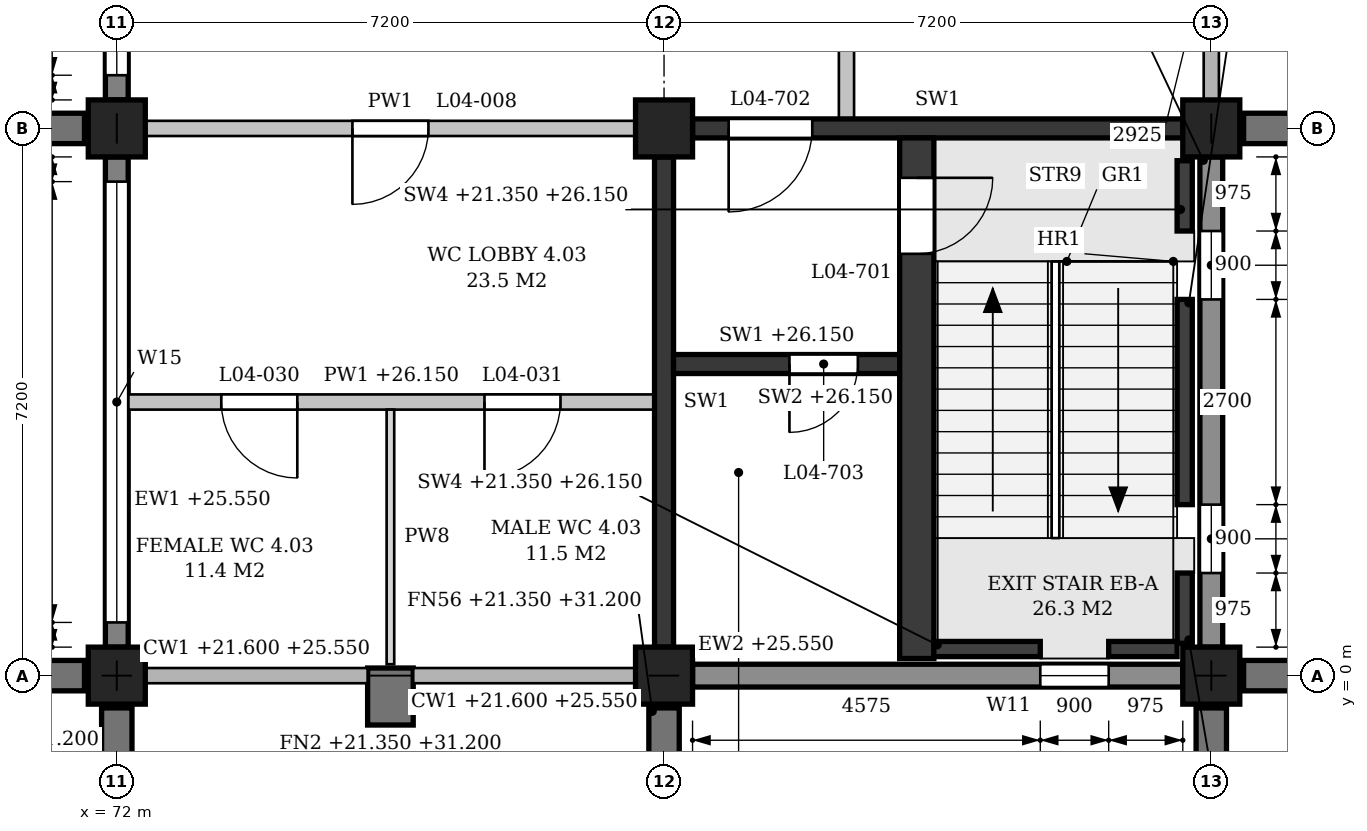
"""IFC4 building model, lengths in metres.
Left out: names, types, materials, properties, quantities, classifications, styles, units other than length and angle.
Written with IfcOpenShell. Run it as: python <this file> out.ifc"""

import sys

from ifc_helpers import new_model, si_unit, direction, frame, frame_2d, origin, origin_2d, place, context, subcontext, project, spatial, polyline, rectangle, outline, extrude, element, fill, save


model = new_model("IFC4")
c1 = context("Model", 3, precision=1e-05, world=origin(), true_north=direction((0.0, 1.0)))
c2 = subcontext(c1, "Body", "Model", "MODEL_VIEW")
j1 = project(units=[si_unit("LENGTHUNIT", "METRE"), si_unit("PLANEANGLEUNIT", "RADIAN")], contexts=[c1])
p1 = place(None, origin())
s1 = spatial("IfcSite", under=j1, at=p1, CompositionType="ELEMENT")
p2 = place(p1, origin())
s2 = spatial("IfcBuilding", under=s1, at=p2, CompositionType="ELEMENT")
p3 = place(p2, frame((0.0, 0.0, 21.6)))
s3 = spatial("IfcBuildingStorey", under=s2, at=p3, CompositionType="ELEMENT", Elevation=21.6)
for number, where, z_axis, x_axis in (
    (1, (72.0, 0.0, 0.0), (0.0, 0.0, 1.0), (1.0, 0.0, 0.0)),
    (2, (72.0, 7.2, 0.0), (0.0, 0.0, 1.0), (1.0, 0.0, 0.0)),
    (3, (79.2, 0.0, 0.0), (0.0, 0.0, 1.0), (1.0, 0.0, 0.0)),
    (4, (79.2, 7.2, 0.0), (0.0, 0.0, 1.0), (1.0, 0.0, 0.0)),
    (5, (86.4, 0.0, 0.0), (0.0, 0.0, 1.0), (1.0, 0.0, 0.0)),
    (6, (86.4, 7.2, 0.0), (0.0, 0.0, 1.0), (1.0, 0.0, 0.0)),
):
    element("IfcColumn", number, at=place(p3, frame(where, z_axis=z_axis, x_axis=x_axis)), inside=s3, PredefinedType="COLUMN", context=c2, shape_type="SweptSolid", body=[
        extrude(rectangle(XDim=0.75, YDim=0.75, at=origin_2d()), origin(), (0.0, 0.0, 1.0), 4.8),
    ])
p4 = place(p3, frame((79.575, 0.0, 0.0), z_axis=(0.0, 0.0, 1.0), x_axis=(1.0, 0.0, 0.0)))
e7 = element("IfcWall", 7, at=p4, inside=s3, PredefinedType="STANDARD", context=c2, shape_type="SweptSolid", body=[
    extrude(rectangle(XDim=6.45, YDim=0.3, at=frame_2d((3.225, 0.0))), origin(), (0.0, 0.0, 1.0), 3.95),
])
p5 = place(p4, frame((4.575, 0.0, 0.9)))
e8 = element("IfcOpeningElement", 8, at=p5, cuts=e7, PredefinedType="OPENING", context=c2, shape_type="SweptSolid", body=[
    extrude(outline(polyline([(0.0, 0.0), (0.9, 0.0), (0.9, 2.05), (0.45, 2.5), (0.0, 2.05), (0.0, 0.0)])), frame((0.0, 0.16, 0.0), z_axis=(0.0, -1.0, 0.0), x_axis=(1.0, 0.0, 0.0)), (0.0, 0.0, 1.0), 0.32),
])
p6 = place(p3, frame((86.4, 0.375, 0.0), z_axis=(0.0, 0.0, 1.0), x_axis=(0.0, 1.0, 0.0)))
e9 = element("IfcWall", 9, at=p6, inside=s3, PredefinedType="STANDARD", context=c2, shape_type="SweptSolid", body=[
    extrude(rectangle(XDim=6.45, YDim=0.3, at=frame_2d((3.225, 0.0))), origin(), (0.0, 0.0, 1.0), 3.95),
])
p7 = place(p6, frame((0.975, 0.0, 0.9)))
e10 = element("IfcOpeningElement", 10, at=p7, cuts=e9, PredefinedType="OPENING", context=c2, shape_type="SweptSolid", body=[
    extrude(outline(polyline([(0.0, 0.0), (0.9, 0.0), (0.9, 2.05), (0.45, 2.5), (0.0, 2.05), (0.0, 0.0)])), frame((0.0, 0.16, 0.0), z_axis=(0.0, -1.0, 0.0), x_axis=(1.0, 0.0, 0.0)), (0.0, 0.0, 1.0), 0.32),
])
p8 = place(p6, frame((4.575, 0.0, 0.9)))
e11 = element("IfcOpeningElement", 11, at=p8, cuts=e9, PredefinedType="OPENING", context=c2, shape_type="SweptSolid", body=[
    extrude(outline(polyline([(0.0, 0.0), (0.9, 0.0), (0.9, 2.05), (0.45, 2.5), (0.0, 2.05), (0.0, 0.0)])), frame((0.0, 0.16, 0.0), z_axis=(0.0, -1.0, 0.0), x_axis=(1.0, 0.0, 0.0)), (0.0, 0.0, 1.0), 0.32),
])
p9 = place(p3, frame((72.0, 0.375, 0.0), z_axis=(0.0, 0.0, 1.0), x_axis=(0.0, 1.0, 0.0)))
e12 = element("IfcWall", 12, at=p9, inside=s3, PredefinedType="STANDARD", context=c2, shape_type="SweptSolid", body=[
    extrude(rectangle(XDim=6.45, YDim=0.3, at=frame_2d((3.225, 0.0))), origin(), (0.0, 0.0, 1.0), 3.95),
])
p10 = place(p9, frame((0.325, 0.0, 0.9)))
e13 = element("IfcOpeningElement", 13, at=p10, cuts=e12, PredefinedType="OPENING", context=c2, shape_type="SweptSolid", body=[
    extrude(outline(polyline([(0.0, 0.0), (5.8, 0.0), (5.8, 1.0), (2.9, 2.5), (0.0, 1.0), (0.0, 0.0)])), frame((0.0, 0.16, 0.0), z_axis=(0.0, -1.0, 0.0), x_axis=(1.0, 0.0, 0.0)), (0.0, 0.0, 1.0), 0.32),
])
p11 = place(p3, frame((72.0, 7.575, 0.0), z_axis=(0.0, 0.0, 1.0), x_axis=(0.0, 1.0, 0.0)))
e14 = element("IfcWall", 14, at=p11, inside=s3, PredefinedType="STANDARD", context=c2, shape_type="SweptSolid", body=[
    extrude(rectangle(XDim=6.45, YDim=0.3, at=frame_2d((3.225, 0.0))), origin(), (0.0, 0.0, 1.0), 3.95),
])
p12 = place(p11, frame((0.325, 0.0, 0.9)))
e15 = element("IfcOpeningElement", 15, at=p12, cuts=e14, PredefinedType="OPENING", context=c2, shape_type="SweptSolid", body=[
    extrude(outline(polyline([(0.0, 0.0), (5.8, 0.0), (5.8, 1.0), (2.9, 2.5), (0.0, 1.0), (0.0, 0.0)])), frame((0.0, 0.16, 0.0), z_axis=(0.0, -1.0, 0.0), x_axis=(1.0, 0.0, 0.0)), (0.0, 0.0, 1.0), 0.32),
])
p13 = place(p3, frame((75.6, 0.1, -0.25), z_axis=(0.0, 0.0, 1.0), x_axis=(0.0, -1.0, 0.0)))
e16 = element("IfcWall", 16, at=p13, inside=s3, PredefinedType="POLYGONAL", context=c2, shape_type="SweptSolid", body=[
    extrude(outline(polyline([(0.75, 0.0), (0.75, 9.4), (0.45, 9.85), (0.3, 9.85), (0.3, 8.95), (0.0, 8.95), (0.0, 5.05), (0.35, 5.05), (0.35, 4.2), (0.0, 4.2), (0.0, 0.25), (0.35, 0.25), (0.35, 0.0), (0.75, 0.0)])), frame((0.0, 0.3, 0.0), z_axis=(0.0, -1.0, 0.0), x_axis=(1.0, 0.0, 0.0)), (0.0, 0.0, 1.0), 0.6),
])
p14 = place(p3, frame((71.575, 0.0, -0.25), z_axis=(0.0, 0.0, 1.0), x_axis=(-1.0, 0.0, 0.0)))
e17 = element("IfcWall", 17, at=p14, inside=s3, PredefinedType="POLYGONAL", context=c2, shape_type="SweptSolid", body=[
    extrude(outline(polyline([(0.6, 0.0), (0.6, 9.175), (0.15, 9.85), (0.0, 9.85), (0.0, 0.0), (0.6, 0.0)])), frame((0.0, 0.2, 0.0), z_axis=(0.0, -1.0, 0.0), x_axis=(1.0, 0.0, 0.0)), (0.0, 0.0, 1.0), 0.4),
])
p15 = place(p3, frame((72.0, -0.425, -0.25), z_axis=(0.0, 0.0, 1.0), x_axis=(0.0, -1.0, 0.0)))
e18 = element("IfcWall", 18, at=p15, inside=s3, PredefinedType="POLYGONAL", context=c2, shape_type="SweptSolid", body=[
    extrude(outline(polyline([(0.85, 0.0), (0.85, 8.8), (0.15, 9.85), (0.0, 9.85), (0.0, 0.0), (0.85, 0.0)])), frame((0.0, 0.2, 0.0), z_axis=(0.0, -1.0, 0.0), x_axis=(1.0, 0.0, 0.0)), (0.0, 0.0, 1.0), 0.4),
])
p16 = place(p3, frame((71.575, 7.2, -0.25), z_axis=(0.0, 0.0, 1.0), x_axis=(-1.0, 0.0, 0.0)))
e19 = element("IfcWall", 19, at=p16, inside=s3, PredefinedType="POLYGONAL", context=c2, shape_type="SweptSolid", body=[
    extrude(outline(polyline([(0.6, 0.0), (0.6, 9.175), (0.15, 9.85), (0.0, 9.85), (0.0, 0.0), (0.6, 0.0)])), frame((0.0, 0.2, 0.0), z_axis=(0.0, -1.0, 0.0), x_axis=(1.0, 0.0, 0.0)), (0.0, 0.0, 1.0), 0.4),
])
for number, where, z_axis, x_axis in (
    (20, (79.2, -0.425, -0.25), (0.0, 0.0, 1.0), (0.0, -1.0, 0.0)),
    (21, (86.4, -0.425, -0.25), (0.0, 0.0, 1.0), (0.0, -1.0, 0.0)),
    (22, (86.825, 0.0, -0.25), (0.0, 0.0, 1.0), (1.0, 0.0, 0.0)),
    (23, (86.825, 7.2, -0.25), (0.0, 0.0, 1.0), (1.0, 0.0, 0.0)),
):
    element("IfcWall", number, at=place(p3, frame(where, z_axis=z_axis, x_axis=x_axis)), inside=s3, PredefinedType="POLYGONAL", context=c2, shape_type="SweptSolid", body=[
        extrude(outline(polyline([(0.85, 0.0), (0.85, 8.8), (0.15, 9.85), (0.0, 9.85), (0.0, 0.0), (0.85, 0.0)])), frame((0.0, 0.2, 0.0), z_axis=(0.0, -1.0, 0.0), x_axis=(1.0, 0.0, 0.0)), (0.0, 0.0, 1.0), 0.4),
    ])
p17 = place(p3, frame((79.575, 7.2, 0.0), z_axis=(0.0, 0.0, 1.0), x_axis=(1.0, 0.0, 0.0)))
e24 = element("IfcWall", 24, at=p17, inside=s3, PredefinedType="SHEAR", context=c2, shape_type="SweptSolid", body=[
    extrude(rectangle(XDim=6.45, YDim=0.25, at=frame_2d((3.225, 0.0))), origin(), (0.0, 0.0, 1.0), 3.8),
])
p18 = place(p17, frame((0.475, 0.0, 0.0)))
e25 = element("IfcOpeningElement", 25, at=p18, cuts=e24, PredefinedType="OPENING", context=c2, shape_type="SweptSolid", body=[
    extrude(rectangle(XDim=1.1, YDim=2.1, at=frame_2d((0.55, 1.05))), frame((0.0, 0.135, 0.0), z_axis=(0.0, -1.0, 0.0), x_axis=(1.0, 0.0, 0.0)), (0.0, 0.0, 1.0), 0.27),
])
p19 = place(p3, frame((79.2, 0.375, 0.0), z_axis=(0.0, 0.0, 1.0), x_axis=(0.0, 1.0, 0.0)))
e26 = element("IfcWall", 26, at=p19, inside=s3, PredefinedType="SHEAR", context=c2, shape_type="SweptSolid", body=[
    extrude(rectangle(XDim=6.45, YDim=0.25, at=frame_2d((3.225, 0.0))), origin(), (0.0, 0.0, 1.0), 3.8),
])
p20 = place(p3, frame((86.05, 0.425, -0.25), z_axis=(0.0, 0.0, 1.0), x_axis=(0.0, 1.0, 0.0)))
e27 = element("IfcWall", 27, at=p20, inside=s3, PredefinedType="SHEAR", context=c2, shape_type="SweptSolid", body=[
    extrude(rectangle(XDim=0.925, YDim=0.2, at=frame_2d((0.462, 0.0))), origin(), (0.0, 0.0, 1.0), 4.8),
])
p21 = place(p3, frame((86.05, 2.25, -0.25), z_axis=(0.0, 0.0, 1.0), x_axis=(0.0, 1.0, 0.0)))
e28 = element("IfcWall", 28, at=p21, inside=s3, PredefinedType="SHEAR", context=c2, shape_type="SweptSolid", body=[
    extrude(rectangle(XDim=2.7, YDim=0.2, at=frame_2d((1.35, 0.0))), origin(), (0.0, 0.0, 1.0), 4.8),
])
p22 = place(p3, frame((86.05, 5.85, -0.25), z_axis=(0.0, 0.0, 1.0), x_axis=(0.0, 1.0, 0.0)))
e29 = element("IfcWall", 29, at=p22, inside=s3, PredefinedType="SHEAR", context=c2, shape_type="SweptSolid", body=[
    extrude(rectangle(XDim=0.925, YDim=0.2, at=frame_2d((0.462, 0.0))), origin(), (0.0, 0.0, 1.0), 4.8),
])
p23 = place(p3, frame((82.75, 0.35, -0.25), z_axis=(0.0, 0.0, 1.0), x_axis=(1.0, 0.0, 0.0)))
e30 = element("IfcWall", 30, at=p23, inside=s3, PredefinedType="SHEAR", context=c2, shape_type="SweptSolid", body=[
    extrude(rectangle(XDim=1.4, YDim=0.2, at=frame_2d((0.7, 0.0))), origin(), (0.0, 0.0, 1.0), 4.8),
])
p24 = place(p3, frame((85.05, 0.35, -0.25), z_axis=(0.0, 0.0, 1.0), x_axis=(1.0, 0.0, 0.0)))
e31 = element("IfcWall", 31, at=p24, inside=s3, PredefinedType="SHEAR", context=c2, shape_type="SweptSolid", body=[
    extrude(rectangle(XDim=0.9, YDim=0.2, at=frame_2d((0.45, 0.0))), origin(), (0.0, 0.0, 1.0), 4.8),
])
p25 = place(p3, frame((82.525, 0.225, 0.0), z_axis=(0.0, 0.0, 1.0), x_axis=(0.0, 1.0, 0.0)))
e32 = element("IfcWall", 32, at=p25, inside=s3, PredefinedType="SHEAR", context=c2, shape_type="SweptSolid", body=[
    extrude(rectangle(XDim=6.85, YDim=0.45, at=frame_2d((3.425, 0.0))), origin(), (0.0, 0.0, 1.0), 4.55),
])
p26 = place(p25, frame((5.325, 0.0, 0.0)))
e33 = element("IfcOpeningElement", 33, at=p26, cuts=e32, PredefinedType="OPENING", context=c2, shape_type="SweptSolid", body=[
    extrude(rectangle(XDim=1.0, YDim=2.1, at=frame_2d((0.5, 1.05))), frame((0.0, 0.235, 0.0), z_axis=(0.0, -1.0, 0.0), x_axis=(1.0, 0.0, 0.0)), (0.0, 0.0, 1.0), 0.47),
])
p27 = place(p3, frame((79.325, 4.1, 0.0), z_axis=(0.0, 0.0, 1.0), x_axis=(1.0, 0.0, 0.0)))
e34 = element("IfcWall", 34, at=p27, inside=s3, PredefinedType="SHEAR", context=c2, shape_type="SweptSolid", body=[
    extrude(rectangle(XDim=2.975, YDim=0.25, at=frame_2d((1.488, 0.0))), origin(), (0.0, 0.0, 1.0), 4.55),
])
p28 = place(p27, frame((1.525, 0.0, 0.0)))
e35 = element("IfcOpeningElement", 35, at=p28, cuts=e34, PredefinedType="OPENING", context=c2, shape_type="SweptSolid", body=[
    extrude(rectangle(XDim=0.9, YDim=2.1, at=frame_2d((0.45, 1.05))), frame((0.0, 0.135, 0.0), z_axis=(0.0, -1.0, 0.0), x_axis=(1.0, 0.0, 0.0)), (0.0, 0.0, 1.0), 0.27),
])
p29 = place(p3, frame((72.15, 3.6, 0.0), z_axis=(0.0, 0.0, 1.0), x_axis=(1.0, 0.0, 0.0)))
e36 = element("IfcWall", 36, at=p29, inside=s3, PredefinedType="PARTITIONING", context=c2, shape_type="SweptSolid", body=[
    extrude(outline(polyline([(0.0, 0.0), (6.925, 0.0), (6.925, 3.8), (6.8, 3.8), (6.8, 4.55), (0.1, 4.55), (0.1, 3.95), (0.0, 3.95), (0.0, 0.0)])), frame((0.0, 0.1, 0.0), z_axis=(0.0, -1.0, 0.0), x_axis=(1.0, 0.0, 0.0)), (0.0, 0.0, 1.0), 0.2),
])
p30 = place(p29, frame((1.225, 0.0, 0.0)))
e37 = element("IfcOpeningElement", 37, at=p30, cuts=e36, PredefinedType="OPENING", context=c2, shape_type="SweptSolid", body=[
    extrude(rectangle(XDim=1.0, YDim=2.1, at=frame_2d((0.5, 1.05))), frame((0.0, 0.11, 0.0), z_axis=(0.0, -1.0, 0.0), x_axis=(1.0, 0.0, 0.0)), (0.0, 0.0, 1.0), 0.22),
])
p31 = place(p29, frame((4.688, 0.0, 0.0)))
e38 = element("IfcOpeningElement", 38, at=p31, cuts=e36, PredefinedType="OPENING", context=c2, shape_type="SweptSolid", body=[
    extrude(rectangle(XDim=1.0, YDim=2.1, at=frame_2d((0.5, 1.05))), frame((0.0, 0.11, 0.0), z_axis=(0.0, -1.0, 0.0), x_axis=(1.0, 0.0, 0.0)), (0.0, 0.0, 1.0), 0.22),
])
p32 = place(p3, frame((72.375, 7.2, 0.0), z_axis=(0.0, 0.0, 1.0), x_axis=(1.0, 0.0, 0.0)))
e39 = element("IfcWall", 39, at=p32, inside=s3, PredefinedType="PARTITIONING", context=c2, shape_type="SweptSolid", body=[
    extrude(rectangle(XDim=6.45, YDim=0.2, at=frame_2d((3.225, 0.0))), origin(), (0.0, 0.0, 1.0), 3.8),
])
p33 = place(p32, frame((2.725, 0.0, 0.0)))
e40 = element("IfcOpeningElement", 40, at=p33, cuts=e39, PredefinedType="OPENING", context=c2, shape_type="SweptSolid", body=[
    extrude(rectangle(XDim=1.0, YDim=2.1, at=frame_2d((0.5, 1.05))), frame((0.0, 0.11, 0.0), z_axis=(0.0, -1.0, 0.0), x_axis=(1.0, 0.0, 0.0)), (0.0, 0.0, 1.0), 0.22),
])
p34 = place(p3, frame((75.6, 0.15, 0.0), z_axis=(0.0, 0.0, 1.0), x_axis=(0.0, 1.0, 0.0)))
e41 = element("IfcWall", 41, at=p34, inside=s3, PredefinedType="PARTITIONING", context=c2, shape_type="SweptSolid", body=[
    extrude(rectangle(XDim=3.35, YDim=0.1, at=frame_2d((1.675, 0.0))), origin(), (0.0, 0.0, 1.0), 3.8),
])
p35 = place(p3, frame((81.6, 7.325, 0.0), z_axis=(0.0, 0.0, 1.0), x_axis=(0.0, 1.0, 0.0)))
e42 = element("IfcWall", 42, at=p35, inside=s3, PredefinedType="PARTITIONING", context=c2, shape_type="SweptSolid", body=[
    extrude(outline(polyline([(0.0, 0.0), (7.075, 0.0), (7.075, 3.8), (6.825, 3.8), (6.825, 4.55), (0.125, 4.55), (0.125, 3.8), (0.0, 3.8), (0.0, 0.0)])), frame((0.0, 0.1, 0.0), z_axis=(0.0, -1.0, 0.0), x_axis=(1.0, 0.0, 0.0)), (0.0, 0.0, 1.0), 0.2),
])
p36 = place(p35, frame((2.537, 0.0, 0.0)))
e43 = element("IfcOpeningElement", 43, at=p36, cuts=e42, PredefinedType="OPENING", context=c2, shape_type="SweptSolid", body=[
    extrude(rectangle(XDim=2.0, YDim=2.1, at=frame_2d((1.0, 1.05))), frame((0.0, 0.11, 0.0), z_axis=(0.0, -1.0, 0.0), x_axis=(1.0, 0.0, 0.0)), (0.0, 0.0, 1.0), 0.22),
])
p37 = place(p7, origin())
e44 = element("IfcWindow", 44, at=p37, inside=s3, PartitioningType="SINGLE_PANEL", PredefinedType="WINDOW", context=c2, shape_type="SweptSolid", body=[
    extrude(outline(polyline([(0.0, 0.0), (0.9, 0.0), (0.9, 2.05), (0.45, 2.5), (0.0, 2.05), (0.0, 0.0)])), frame((0.0, 0.03, 0.0), z_axis=(0.0, -1.0, 0.0), x_axis=(1.0, 0.0, 0.0)), (0.0, 0.0, 1.0), 0.06),
])
fill(e10, e44)
p38 = place(p8, origin())
e45 = element("IfcWindow", 45, at=p38, inside=s3, PartitioningType="SINGLE_PANEL", PredefinedType="WINDOW", context=c2, shape_type="SweptSolid", body=[
    extrude(outline(polyline([(0.0, 0.0), (0.9, 0.0), (0.9, 2.05), (0.45, 2.5), (0.0, 2.05), (0.0, 0.0)])), frame((0.0, 0.03, 0.0), z_axis=(0.0, -1.0, 0.0), x_axis=(1.0, 0.0, 0.0)), (0.0, 0.0, 1.0), 0.06),
])
fill(e11, e45)
p39 = place(p5, origin())
e46 = element("IfcWindow", 46, at=p39, inside=s3, PartitioningType="SINGLE_PANEL", PredefinedType="WINDOW", context=c2, shape_type="SweptSolid", body=[
    extrude(outline(polyline([(0.0, 0.0), (0.9, 0.0), (0.9, 2.05), (0.45, 2.5), (0.0, 2.05), (0.0, 0.0)])), frame((0.0, 0.03, 0.0), z_axis=(0.0, -1.0, 0.0), x_axis=(1.0, 0.0, 0.0)), (0.0, 0.0, 1.0), 0.06),
])
fill(e8, e46)
p40 = place(p10, origin())
e47 = element("IfcWindow", 47, at=p40, inside=s3, PartitioningType="TRIPLE_PANEL_VERTICAL", PredefinedType="WINDOW", context=c2, shape_type="SweptSolid", body=[
    extrude(outline(polyline([(0.0, 0.0), (5.8, 0.0), (5.8, 1.0), (2.9, 2.5), (0.0, 1.0), (0.0, 0.0)])), frame((0.0, 0.03, 0.0), z_axis=(0.0, -1.0, 0.0), x_axis=(1.0, 0.0, 0.0)), (0.0, 0.0, 1.0), 0.06),
])
fill(e13, e47)
p41 = place(p12, origin())
e48 = element("IfcWindow", 48, at=p41, inside=s3, PartitioningType="TRIPLE_PANEL_VERTICAL", PredefinedType="WINDOW", context=c2, shape_type="SweptSolid", body=[
    extrude(outline(polyline([(0.0, 0.0), (5.8, 0.0), (5.8, 1.0), (2.9, 2.5), (0.0, 1.0), (0.0, 0.0)])), frame((0.0, 0.03, 0.0), z_axis=(0.0, -1.0, 0.0), x_axis=(1.0, 0.0, 0.0)), (0.0, 0.0, 1.0), 0.06),
])
fill(e15, e48)
p42 = place(p26, frame((1.0, 0.0, 0.0), z_axis=(0.0, 0.0, 1.0), x_axis=(-1.0, 0.0, 0.0)))
e49 = element("IfcDoor", 49, at=p42, inside=s3, OperationType="SINGLE_SWING_LEFT", PredefinedType="DOOR", context=c2, shape_type="SweptSolid", body=[
    extrude(rectangle(XDim=1.0, YDim=2.1, at=frame_2d((0.5, 1.05))), frame((0.0, 0.025, 0.0), z_axis=(0.0, -1.0, 0.0), x_axis=(1.0, 0.0, 0.0)), (0.0, 0.0, 1.0), 0.05),
])
fill(e33, e49)
p43 = place(p18, frame((1.1, 0.0, 0.0), z_axis=(0.0, 0.0, 1.0), x_axis=(-1.0, 0.0, 0.0)))
e50 = element("IfcDoor", 50, at=p43, inside=s3, OperationType="SINGLE_SWING_RIGHT", PredefinedType="DOOR", context=c2, shape_type="SweptSolid", body=[
    extrude(rectangle(XDim=1.1, YDim=2.1, at=frame_2d((0.55, 1.05))), frame((0.0, 0.025, 0.0), z_axis=(0.0, -1.0, 0.0), x_axis=(1.0, 0.0, 0.0)), (0.0, 0.0, 1.0), 0.05),
])
fill(e25, e50)
p44 = place(p28, frame((0.9, 0.0, 0.0), z_axis=(0.0, 0.0, 1.0), x_axis=(-1.0, 0.0, 0.0)))
e51 = element("IfcDoor", 51, at=p44, inside=s3, OperationType="SINGLE_SWING_RIGHT", PredefinedType="DOOR", context=c2, shape_type="SweptSolid", body=[
    extrude(rectangle(XDim=0.9, YDim=2.1, at=frame_2d((0.45, 1.05))), frame((0.0, 0.025, 0.0), z_axis=(0.0, -1.0, 0.0), x_axis=(1.0, 0.0, 0.0)), (0.0, 0.0, 1.0), 0.05),
])
fill(e35, e51)
p45 = place(p33, frame((1.0, 0.0, 0.0), z_axis=(0.0, 0.0, 1.0), x_axis=(-1.0, 0.0, 0.0)))
e52 = element("IfcDoor", 52, at=p45, inside=s3, OperationType="SINGLE_SWING_RIGHT", PredefinedType="DOOR", context=c2, shape_type="SweptSolid", body=[
    extrude(rectangle(XDim=1.0, YDim=2.1, at=frame_2d((0.5, 1.05))), frame((0.0, 0.025, 0.0), z_axis=(0.0, -1.0, 0.0), x_axis=(1.0, 0.0, 0.0)), (0.0, 0.0, 1.0), 0.05),
])
fill(e40, e52)
p46 = place(p30, frame((1.0, 0.0, 0.0), z_axis=(0.0, 0.0, 1.0), x_axis=(-1.0, 0.0, 0.0)))
e53 = element("IfcDoor", 53, at=p46, inside=s3, OperationType="SINGLE_SWING_LEFT", PredefinedType="DOOR", context=c2, shape_type="SweptSolid", body=[
    extrude(rectangle(XDim=1.0, YDim=2.1, at=frame_2d((0.5, 1.05))), frame((0.0, 0.025, 0.0), z_axis=(0.0, -1.0, 0.0), x_axis=(1.0, 0.0, 0.0)), (0.0, 0.0, 1.0), 0.05),
])
fill(e37, e53)
p47 = place(p31, frame((1.0, 0.0, 0.0), z_axis=(0.0, 0.0, 1.0), x_axis=(-1.0, 0.0, 0.0)))
e54 = element("IfcDoor", 54, at=p47, inside=s3, OperationType="SINGLE_SWING_RIGHT", PredefinedType="DOOR", context=c2, shape_type="SweptSolid", body=[
    extrude(rectangle(XDim=1.0, YDim=2.1, at=frame_2d((0.5, 1.05))), frame((0.0, 0.025, 0.0), z_axis=(0.0, -1.0, 0.0), x_axis=(1.0, 0.0, 0.0)), (0.0, 0.0, 1.0), 0.05),
])
fill(e38, e54)
save(model, sys.argv[1])
